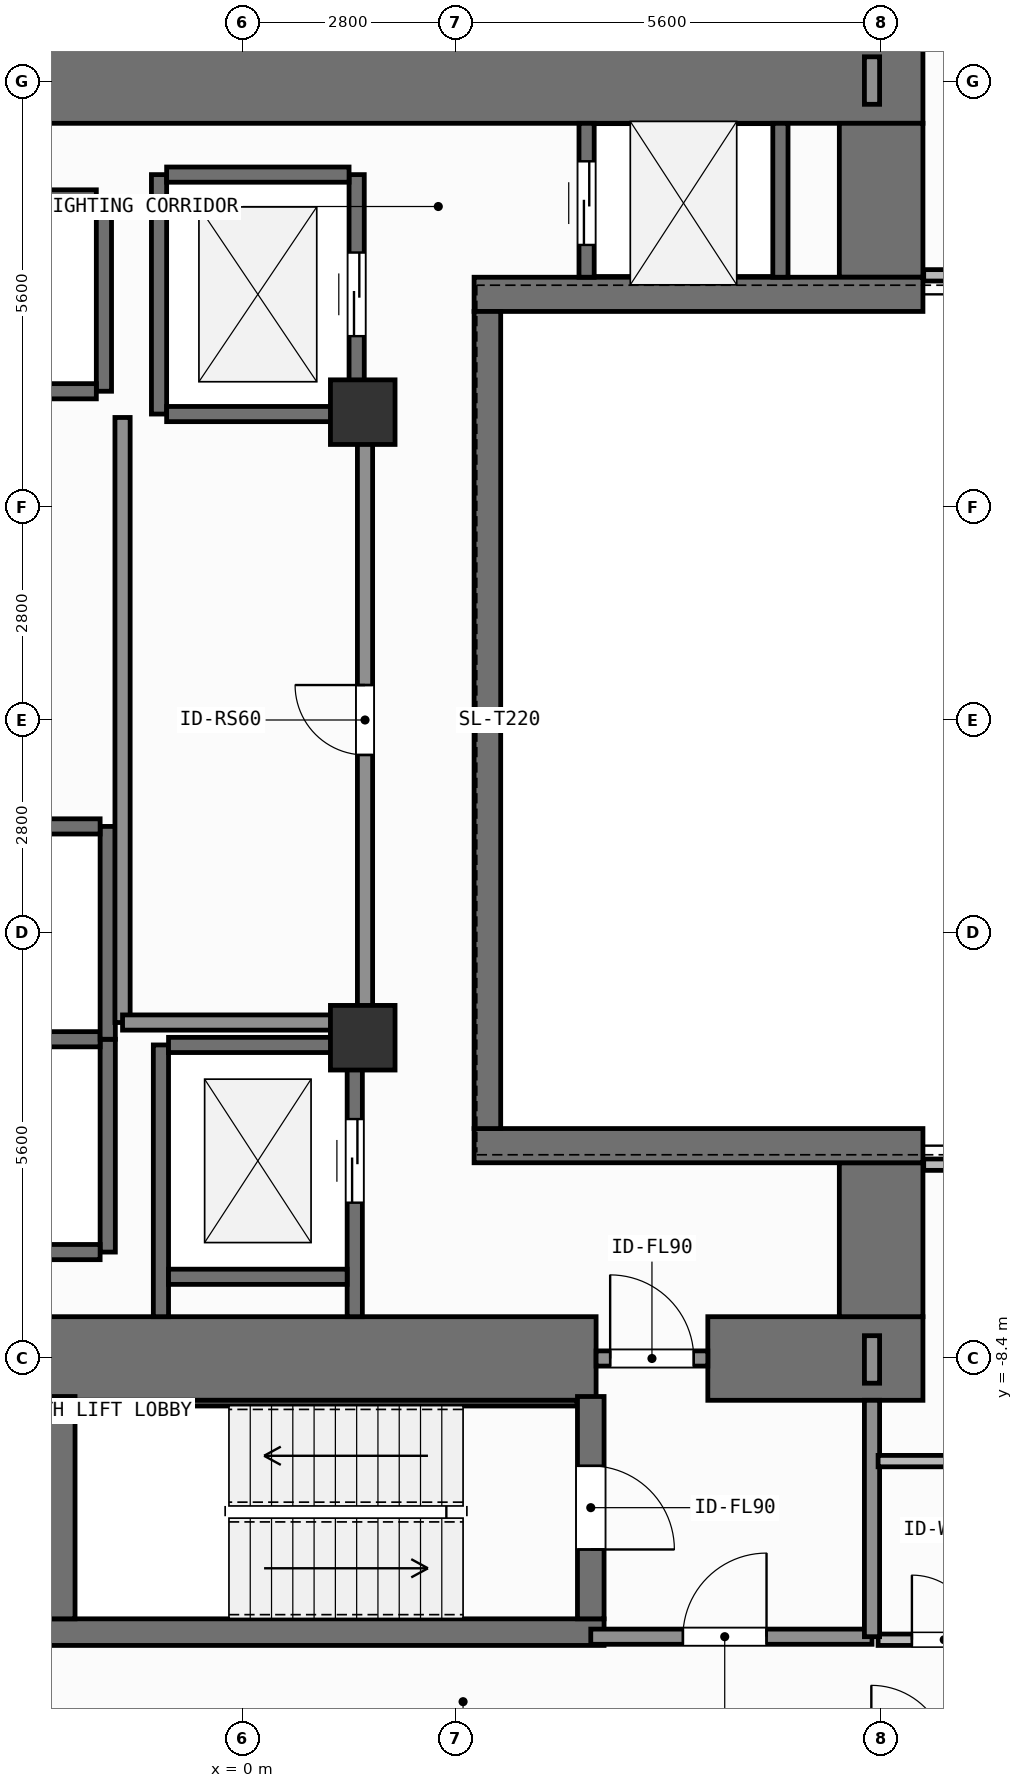
"""IFC4 building model, lengths in metres.
Left out: names, types, materials, properties, quantities, classifications, styles, units other than length and angle.
Written with IfcOpenShell. Run it as: python <this file> out.ifc"""

import sys

from ifc_helpers import new_model, si_unit, direction, frame, frame_2d, origin, origin_2d, place, context, subcontext, project, spatial, rectangle, extrude, element, fill, save


model = new_model("IFC4")
c1 = context("Model", 3, precision=1e-05, world=origin(), true_north=direction((0.0, 1.0)))
c2 = subcontext(c1, "Body", "Model", "MODEL_VIEW")
j1 = project(units=[si_unit("LENGTHUNIT", "METRE"), si_unit("PLANEANGLEUNIT", "RADIAN")], contexts=[c1])
p1 = place(None, origin())
s1 = spatial("IfcSite", under=j1, at=p1, CompositionType="ELEMENT")
p2 = place(p1, origin())
s2 = spatial("IfcBuilding", under=s1, at=p2, CompositionType="ELEMENT")
p3 = place(p2, frame((0.0, 0.0, 38.4)))
s3 = spatial("IfcBuildingStorey", under=s2, at=p3, CompositionType="ELEMENT", Elevation=38.4)
p4 = place(p3, frame((-2.62, -8.4, 0.0), z_axis=(0.0, 0.0, 1.0), x_axis=(1.0, 0.0, 0.0)))
e1 = element("IfcWall", 1, at=p4, inside=s3, PredefinedType="SHEAR", context=c2, shape_type="SweptSolid", body=[
    extrude(rectangle(XDim=7.27, YDim=1.1, at=frame_2d((3.635, 0.0))), origin(), (0.0, 0.0, 1.0), 3.9),
])
p5 = place(p3, frame((6.12, -8.4, 0.0), z_axis=(0.0, 0.0, 1.0), x_axis=(1.0, 0.0, 0.0)))
e2 = element("IfcWall", 2, at=p5, inside=s3, PredefinedType="SHEAR", context=c2, shape_type="SweptSolid", body=[
    extrude(rectangle(XDim=2.83, YDim=1.1, at=frame_2d((1.415, 0.0))), origin(), (0.0, 0.0, 1.0), 3.9),
])
p6 = place(p3, frame((-7.55, 8.4, 0.0), z_axis=(0.0, 0.0, 1.0), x_axis=(1.0, 0.0, 0.0)))
e3 = element("IfcWall", 3, at=p6, inside=s3, PredefinedType="SHEAR", context=c2, shape_type="SweptSolid", body=[
    extrude(rectangle(XDim=16.5, YDim=1.1, at=frame_2d((8.25, 0.0))), origin(), (0.0, 0.0, 1.0), 3.9),
])
for number, where, z_axis, x_axis in (
    (4, (8.4, -7.85, 0.0), (0.0, 0.0, 1.0), (0.0, 1.0, 0.0)),
    (5, (8.4, 5.825, 0.0), (0.0, 0.0, 1.0), (0.0, 1.0, 0.0)),
):
    element("IfcWall", number, at=place(p3, frame(where, z_axis=z_axis, x_axis=x_axis)), inside=s3, PredefinedType="SHEAR", context=c2, shape_type="SweptSolid", body=[
        extrude(rectangle(XDim=2.025, YDim=1.1, at=frame_2d((1.013, 0.0))), origin(), (0.0, 0.0, 1.0), 3.9),
    ])
for number, where, z_axis, x_axis in (
    (6, (3.045, -5.6, 0.0), (0.0, 0.0, 1.0), (1.0, 0.0, 0.0)),
    (7, (3.045, 5.6, 0.0), (0.0, 0.0, 1.0), (1.0, 0.0, 0.0)),
):
    element("IfcWall", number, at=place(p3, frame(where, z_axis=z_axis, x_axis=x_axis)), inside=s3, PredefinedType="SHEAR", context=c2, shape_type="SweptSolid", body=[
        extrude(rectangle(XDim=5.905, YDim=0.45, at=frame_2d((2.953, 0.0))), origin(), (0.0, 0.0, 1.0), 3.9),
    ])
p7 = place(p3, frame((3.22, -5.375, 0.0), z_axis=(0.0, 0.0, 1.0), x_axis=(0.0, 1.0, 0.0)))
e8 = element("IfcWall", 8, at=p7, inside=s3, PredefinedType="SHEAR", context=c2, shape_type="SweptSolid", body=[
    extrude(rectangle(XDim=10.75, YDim=0.35, at=frame_2d((5.375, 0.0))), origin(), (0.0, 0.0, 1.0), 3.9),
])
p8 = place(p3, frame((-2.555, -12.0, 0.0), z_axis=(0.0, 0.0, 1.0), x_axis=(1.0, 0.0, 0.0)))
e9 = element("IfcWall", 9, at=p8, inside=s3, PredefinedType="SHEAR", context=c2, shape_type="SweptSolid", body=[
    extrude(rectangle(XDim=7.31, YDim=0.35, at=frame_2d((3.655, 0.0))), origin(), (0.0, 0.0, 1.0), 3.9),
])
p9 = place(p3, frame((-2.2, -8.988, 0.0), z_axis=(0.0, 0.0, 1.0), x_axis=(1.0, 0.0, 0.0)))
e10 = element("IfcWall", 10, at=p9, inside=s3, PredefinedType="SHEAR", context=c2, shape_type="SweptSolid", body=[
    extrude(rectangle(XDim=6.6, YDim=0.075, at=frame_2d((3.3, 0.0))), origin(), (0.0, 0.0, 1.0), 3.9),
])
p10 = place(p3, frame((-2.38, -11.825, 0.0), z_axis=(0.0, 0.0, 1.0), x_axis=(0.0, 1.0, 0.0)))
e11 = element("IfcWall", 11, at=p10, inside=s3, PredefinedType="SHEAR", context=c2, shape_type="SweptSolid", body=[
    extrude(rectangle(XDim=2.925, YDim=0.35, at=frame_2d((1.462, 0.0))), origin(), (0.0, 0.0, 1.0), 3.9),
])
p11 = place(p3, frame((4.58, -8.9, 0.0), z_axis=(0.0, 0.0, 1.0), x_axis=(0.0, -1.0, 0.0)))
e12 = element("IfcWall", 12, at=p11, inside=s3, PredefinedType="SHEAR", context=c2, shape_type="SweptSolid", body=[
    extrude(rectangle(XDim=2.925, YDim=0.35, at=frame_2d((1.462, 0.0))), origin(), (0.0, 0.0, 1.0), 3.9),
])
p12 = place(p11, frame((0.913, 0.0, 0.0)))
e13 = element("IfcOpeningElement", 13, at=p12, cuts=e12, PredefinedType="OPENING", context=c2, shape_type="SweptSolid", body=[
    extrude(rectangle(XDim=1.1, YDim=2.15, at=frame_2d((0.55, 1.075))), frame((0.0, 0.185, 0.0), z_axis=(0.0, -1.0, 0.0), x_axis=(1.0, 0.0, 0.0)), (0.0, 0.0, 1.0), 0.37),
])
for number, where, z_axis, x_axis in (
    (14, (1.58, -4.18, 0.0), (0.0, 0.0, 1.0), (1.0, 0.0, 0.0)),
    (15, (1.58, 4.05, 0.0), (0.0, 0.0, 1.0), (1.0, 0.0, 0.0)),
):
    element("IfcColumn", number, at=place(p3, frame(where, z_axis=z_axis, x_axis=x_axis)), inside=s3, PredefinedType="COLUMN", context=c2, shape_type="SweptSolid", body=[
        extrude(rectangle(XDim=0.85, YDim=0.85, at=origin_2d()), origin(), (0.0, 0.0, 1.0), 3.9),
    ])
p13 = place(p3, frame((-1.825, 4.325, 0.0), z_axis=(0.0, 0.0, 1.0), x_axis=(0.0, 1.0, 0.0)))
e16 = element("IfcWall", 16, at=p13, inside=s3, PredefinedType="SHEAR", context=c2, shape_type="SweptSolid", body=[
    extrude(rectangle(XDim=2.55, YDim=0.2, at=frame_2d((1.275, 0.0))), origin(), (0.0, 0.0, 1.0), 3.68),
])
for number, where, z_axis, x_axis in (
    (17, (-4.275, 4.325, 0.0), (0.0, 0.0, 1.0), (1.0, 0.0, 0.0)),
    (18, (-4.275, 6.875, 0.0), (0.0, 0.0, 1.0), (1.0, 0.0, 0.0)),
):
    element("IfcWall", number, at=place(p3, frame(where, z_axis=z_axis, x_axis=x_axis)), inside=s3, PredefinedType="SHEAR", context=c2, shape_type="SweptSolid", body=[
        extrude(rectangle(XDim=2.35, YDim=0.2, at=frame_2d((1.175, 0.0))), origin(), (0.0, 0.0, 1.0), 3.68),
    ])
p14 = place(p3, frame((-1.775, -7.0, 0.0), z_axis=(0.0, 0.0, 1.0), x_axis=(0.0, 1.0, 0.0)))
e19 = element("IfcWall", 19, at=p14, inside=s3, PredefinedType="SHEAR", context=c2, shape_type="SweptSolid", body=[
    extrude(rectangle(XDim=2.8, YDim=0.2, at=frame_2d((1.4, 0.0))), origin(), (0.0, 0.0, 1.0), 3.68),
])
for number, where, z_axis, x_axis in (
    (20, (-4.325, -7.0, 0.0), (0.0, 0.0, 1.0), (1.0, 0.0, 0.0)),
    (21, (-4.325, -4.2, 0.0), (0.0, 0.0, 1.0), (1.0, 0.0, 0.0)),
):
    element("IfcWall", number, at=place(p3, frame(where, z_axis=z_axis, x_axis=x_axis)), inside=s3, PredefinedType="SHEAR", context=c2, shape_type="SweptSolid", body=[
        extrude(rectangle(XDim=2.45, YDim=0.2, at=frame_2d((1.225, 0.0))), origin(), (0.0, 0.0, 1.0), 3.68),
    ])
p15 = place(p3, frame((-1.775, -4.2, 0.0), z_axis=(0.0, 0.0, 1.0), x_axis=(0.0, 1.0, 0.0)))
e22 = element("IfcWall", 22, at=p15, inside=s3, PredefinedType="SHEAR", context=c2, shape_type="SweptSolid", body=[
    extrude(rectangle(XDim=2.8, YDim=0.2, at=frame_2d((1.4, 0.0))), origin(), (0.0, 0.0, 1.0), 3.68),
])
p16 = place(p3, frame((-4.325, -1.4, 0.0), z_axis=(0.0, 0.0, 1.0), x_axis=(1.0, 0.0, 0.0)))
e23 = element("IfcWall", 23, at=p16, inside=s3, PredefinedType="SHEAR", context=c2, shape_type="SweptSolid", body=[
    extrude(rectangle(XDim=2.45, YDim=0.2, at=frame_2d((1.225, 0.0))), origin(), (0.0, 0.0, 1.0), 3.68),
])
p17 = place(p3, frame((-1.1, 4.025, 0.0), z_axis=(0.0, 0.0, 1.0), x_axis=(0.0, 1.0, 0.0)))
e24 = element("IfcWall", 24, at=p17, inside=s3, PredefinedType="SHEAR", context=c2, shape_type="SweptSolid", body=[
    extrude(rectangle(XDim=3.15, YDim=0.2, at=frame_2d((1.575, 0.0))), origin(), (0.0, 0.0, 1.0), 3.68),
])
p18 = place(p3, frame((1.5, 4.025, 0.0), z_axis=(0.0, 0.0, 1.0), x_axis=(0.0, 1.0, 0.0)))
e25 = element("IfcWall", 25, at=p18, inside=s3, PredefinedType="SHEAR", context=c2, shape_type="SweptSolid", body=[
    extrude(rectangle(XDim=3.15, YDim=0.2, at=frame_2d((1.575, 0.0))), origin(), (0.0, 0.0, 1.0), 3.68),
])
p19 = place(p18, frame((1.025, 0.0, 0.0)))
e26 = element("IfcOpeningElement", 26, at=p19, cuts=e25, PredefinedType="OPENING", context=c2, shape_type="SweptSolid", body=[
    extrude(rectangle(XDim=1.1, YDim=2.2, at=frame_2d((0.55, 1.1))), frame((0.0, 0.11, 0.0), z_axis=(0.0, -1.0, 0.0), x_axis=(1.0, 0.0, 0.0)), (0.0, 0.0, 1.0), 0.22),
])
for number, where, z_axis, x_axis in (
    (27, (-1.0, 4.025, 0.0), (0.0, 0.0, 1.0), (1.0, 0.0, 0.0)),
    (28, (-1.0, 7.175, 0.0), (0.0, 0.0, 1.0), (1.0, 0.0, 0.0)),
):
    element("IfcWall", number, at=place(p3, frame(where, z_axis=z_axis, x_axis=x_axis)), inside=s3, PredefinedType="SHEAR", context=c2, shape_type="SweptSolid", body=[
        extrude(rectangle(XDim=2.4, YDim=0.2, at=frame_2d((1.2, 0.0))), origin(), (0.0, 0.0, 1.0), 3.68),
    ])
p20 = place(p3, frame((-1.075, -7.85, 0.0), z_axis=(0.0, 0.0, 1.0), x_axis=(0.0, 1.0, 0.0)))
e29 = element("IfcWall", 29, at=p20, inside=s3, PredefinedType="SHEAR", context=c2, shape_type="SweptSolid", body=[
    extrude(rectangle(XDim=3.575, YDim=0.2, at=frame_2d((1.788, 0.0))), origin(), (0.0, 0.0, 1.0), 3.68),
])
p21 = place(p3, frame((1.475, -7.85, 0.0), z_axis=(0.0, 0.0, 1.0), x_axis=(0.0, 1.0, 0.0)))
e30 = element("IfcWall", 30, at=p21, inside=s3, PredefinedType="SHEAR", context=c2, shape_type="SweptSolid", body=[
    extrude(rectangle(XDim=3.575, YDim=0.2, at=frame_2d((1.788, 0.0))), origin(), (0.0, 0.0, 1.0), 3.68),
])
p22 = place(p21, frame((1.5, 0.0, 0.0)))
e31 = element("IfcOpeningElement", 31, at=p22, cuts=e30, PredefinedType="OPENING", context=c2, shape_type="SweptSolid", body=[
    extrude(rectangle(XDim=1.1, YDim=2.2, at=frame_2d((0.55, 1.1))), frame((0.0, 0.11, 0.0), z_axis=(0.0, -1.0, 0.0), x_axis=(1.0, 0.0, 0.0)), (0.0, 0.0, 1.0), 0.22),
])
for number, where, z_axis, x_axis in (
    (32, (-0.975, -7.325, 0.0), (0.0, 0.0, 1.0), (1.0, 0.0, 0.0)),
    (33, (-0.975, -4.275, 0.0), (0.0, 0.0, 1.0), (1.0, 0.0, 0.0)),
):
    element("IfcWall", number, at=place(p3, frame(where, z_axis=z_axis, x_axis=x_axis)), inside=s3, PredefinedType="SHEAR", context=c2, shape_type="SweptSolid", body=[
        extrude(rectangle(XDim=2.35, YDim=0.2, at=frame_2d((1.175, 0.0))), origin(), (0.0, 0.0, 1.0), 3.68),
    ])
p23 = place(p3, frame((4.525, 5.825, 0.0), z_axis=(0.0, 0.0, 1.0), x_axis=(0.0, 1.0, 0.0)))
e34 = element("IfcWall", 34, at=p23, inside=s3, PredefinedType="SHEAR", context=c2, shape_type="SweptSolid", body=[
    extrude(rectangle(XDim=2.025, YDim=0.2, at=frame_2d((1.013, 0.0))), origin(), (0.0, 0.0, 1.0), 3.68),
])
p24 = place(p23, frame((0.425, 0.0, 0.0)))
e35 = element("IfcOpeningElement", 35, at=p24, cuts=e34, PredefinedType="OPENING", context=c2, shape_type="SweptSolid", body=[
    extrude(rectangle(XDim=1.1, YDim=2.2, at=frame_2d((0.55, 1.1))), frame((0.0, 0.11, 0.0), z_axis=(0.0, -1.0, 0.0), x_axis=(1.0, 0.0, 0.0)), (0.0, 0.0, 1.0), 0.22),
])
p25 = place(p3, frame((7.075, 5.825, 0.0), z_axis=(0.0, 0.0, 1.0), x_axis=(0.0, 1.0, 0.0)))
e36 = element("IfcWall", 36, at=p25, inside=s3, PredefinedType="SHEAR", context=c2, shape_type="SweptSolid", body=[
    extrude(rectangle(XDim=2.025, YDim=0.2, at=frame_2d((1.013, 0.0))), origin(), (0.0, 0.0, 1.0), 3.68),
])
p26 = place(p3, frame((4.58, -12.06, 0.0), z_axis=(0.0, 0.0, 1.0), x_axis=(1.0, 0.0, 0.0)))
e37 = element("IfcWall", 37, at=p26, inside=s3, PredefinedType="SOLIDWALL", context=c2, shape_type="SweptSolid", body=[
    extrude(rectangle(XDim=3.7, YDim=0.2, at=frame_2d((1.85, 0.0))), origin(), (0.0, 0.0, 1.0), 3.68),
])
p27 = place(p26, frame((1.212, 0.0, 0.0)))
e38 = element("IfcOpeningElement", 38, at=p27, cuts=e37, PredefinedType="OPENING", context=c2, shape_type="SweptSolid", body=[
    extrude(rectangle(XDim=1.1, YDim=2.15, at=frame_2d((0.55, 1.075))), frame((0.0, 0.11, 0.0), z_axis=(0.0, -1.0, 0.0), x_axis=(1.0, 0.0, 0.0)), (0.0, 0.0, 1.0), 0.22),
])
p28 = place(p3, frame((4.65, -8.4, 0.0), z_axis=(0.0, 0.0, 1.0), x_axis=(1.0, 0.0, 0.0)))
e39 = element("IfcWall", 39, at=p28, inside=s3, PredefinedType="SOLIDWALL", context=c2, shape_type="SweptSolid", body=[
    extrude(rectangle(XDim=1.47, YDim=0.2, at=frame_2d((0.735, 0.0))), origin(), (0.0, 0.0, 1.0), 2.72),
])
p29 = place(p28, frame((0.185, 0.0, 0.0)))
e40 = element("IfcOpeningElement", 40, at=p29, cuts=e39, PredefinedType="OPENING", context=c2, shape_type="SweptSolid", body=[
    extrude(rectangle(XDim=1.1, YDim=2.15, at=frame_2d((0.55, 1.075))), frame((0.0, 0.11, 0.0), z_axis=(0.0, -1.0, 0.0), x_axis=(1.0, 0.0, 0.0)), (0.0, 0.0, 1.0), 0.22),
])
p30 = place(p3, frame((1.61, -3.98, 0.0), z_axis=(0.0, 0.0, 1.0), x_axis=(0.0, 1.0, 0.0)))
e41 = element("IfcWall", 41, at=p30, inside=s3, PredefinedType="SOLIDWALL", context=c2, shape_type="SweptSolid", body=[
    extrude(rectangle(XDim=7.96, YDim=0.2, at=frame_2d((3.98, 0.0))), origin(), (0.0, 0.0, 1.0), 3.68),
])
p31 = place(p30, frame((3.52, 0.0, 0.0)))
e42 = element("IfcOpeningElement", 42, at=p31, cuts=e41, PredefinedType="OPENING", context=c2, shape_type="SweptSolid", body=[
    extrude(rectangle(XDim=0.92, YDim=2.1, at=frame_2d((0.46, 1.05))), frame((0.0, 0.11, 0.0), z_axis=(0.0, -1.0, 0.0), x_axis=(1.0, 0.0, 0.0)), (0.0, 0.0, 1.0), 0.22),
])
p32 = place(p3, frame((8.36, -12.1, 0.0), z_axis=(0.0, 0.0, 1.0), x_axis=(1.0, 0.0, 0.0)))
e43 = element("IfcWall", 43, at=p32, inside=s3, PredefinedType="PARTITIONING", context=c2, shape_type="SweptSolid", body=[
    extrude(rectangle(XDim=1.74, YDim=0.15, at=frame_2d((0.87, 0.0))), origin(), (0.0, 0.0, 1.0), 3.68),
])
p33 = place(p32, frame((0.445, 0.0, 0.0)))
e44 = element("IfcOpeningElement", 44, at=p33, cuts=e43, PredefinedType="OPENING", context=c2, shape_type="SweptSolid", body=[
    extrude(rectangle(XDim=0.85, YDim=2.1, at=frame_2d((0.425, 1.05))), frame((0.0, 0.085, 0.0), z_axis=(0.0, -1.0, 0.0), x_axis=(1.0, 0.0, 0.0)), (0.0, 0.0, 1.0), 0.17),
])
p34 = place(p3, frame((8.28, -12.06, 0.0), z_axis=(0.0, 0.0, 1.0), x_axis=(0.0, 1.0, 0.0)))
e45 = element("IfcWall", 45, at=p34, inside=s3, PredefinedType="SOLIDWALL", context=c2, shape_type="SweptSolid", body=[
    extrude(rectangle(XDim=3.11, YDim=0.2, at=frame_2d((1.555, 0.0))), origin(), (0.0, 0.0, 1.0), 3.68),
])
p35 = place(p3, frame((-1.58, -3.98, 0.0), z_axis=(0.0, 0.0, 1.0), x_axis=(0.0, 1.0, 0.0)))
e46 = element("IfcWall", 46, at=p35, inside=s3, PredefinedType="SOLIDWALL", context=c2, shape_type="SweptSolid", body=[
    extrude(rectangle(XDim=7.96, YDim=0.2, at=frame_2d((3.98, 0.0))), origin(), (0.0, 0.0, 1.0), 3.68),
])
p36 = place(p3, frame((-1.58, -3.98, 0.0), z_axis=(0.0, 0.0, 1.0), x_axis=(1.0, 0.0, 0.0)))
e47 = element("IfcWall", 47, at=p36, inside=s3, PredefinedType="SOLIDWALL", context=c2, shape_type="SweptSolid", body=[
    extrude(rectangle(XDim=3.19, YDim=0.2, at=frame_2d((1.595, 0.0))), origin(), (0.0, 0.0, 1.0), 3.68),
])
p37 = place(p3, frame((8.28, -8.725, 0.0), z_axis=(0.0, 0.0, 1.0), x_axis=(0.0, 1.0, 0.0)))
e48 = element("IfcWall", 48, at=p37, inside=s3, PredefinedType="SOLIDWALL", context=c2, shape_type="SweptSolid", body=[
    extrude(rectangle(XDim=0.625, YDim=0.2, at=frame_2d((0.312, 0.0))), origin(), (0.0, 0.0, 1.0), 3.68),
])
p38 = place(p3, frame((8.36, -9.75, 0.0), z_axis=(0.0, 0.0, 1.0), x_axis=(1.0, 0.0, 0.0)))
e49 = element("IfcWall", 49, at=p38, inside=s3, PredefinedType="PARTITIONING", context=c2, shape_type="SweptSolid", body=[
    extrude(rectangle(XDim=1.74, YDim=0.15, at=frame_2d((0.87, 0.0))), origin(), (0.0, 0.0, 1.0), 3.68),
])
p39 = place(p3, frame((8.96, -5.85, 0.0), z_axis=(0.0, 0.0, 1.0), x_axis=(1.0, 0.0, 0.0)))
e50 = element("IfcWall", 50, at=p39, inside=s3, PredefinedType="PARTITIONING", context=c2, shape_type="SweptSolid", body=[
    extrude(rectangle(XDim=6.62, YDim=0.15, at=frame_2d((3.31, 0.0))), origin(), (0.0, 0.0, 1.0), 3.68),
])
p40 = place(p3, frame((8.28, 8.1, 0.0), z_axis=(0.0, 0.0, 1.0), x_axis=(0.0, 1.0, 0.0)))
e51 = element("IfcWall", 51, at=p40, inside=s3, PredefinedType="SOLIDWALL", context=c2, shape_type="SweptSolid", body=[
    extrude(rectangle(XDim=0.625, YDim=0.2, at=frame_2d((0.312, 0.0))), origin(), (0.0, 0.0, 1.0), 3.68),
])
p41 = place(p3, frame((8.96, 5.85, 0.0), z_axis=(0.0, 0.0, 1.0), x_axis=(1.0, 0.0, 0.0)))
e52 = element("IfcWall", 52, at=p41, inside=s3, PredefinedType="PARTITIONING", context=c2, shape_type="SweptSolid", body=[
    extrude(rectangle(XDim=6.62, YDim=0.15, at=frame_2d((3.31, 0.0))), origin(), (0.0, 0.0, 1.0), 3.68),
])
p42 = place(p19, origin())
e53 = element("IfcDoor", 53, at=p42, inside=s3, OperationType="SLIDING_TO_LEFT", PredefinedType="DOOR", context=c2, shape_type="SweptSolid", body=[
    extrude(rectangle(XDim=1.1, YDim=2.2, at=frame_2d((0.55, 1.1))), frame((0.0, 0.025, 0.0), z_axis=(0.0, -1.0, 0.0), x_axis=(1.0, 0.0, 0.0)), (0.0, 0.0, 1.0), 0.05),
])
fill(e26, e53)
p43 = place(p22, origin())
e54 = element("IfcDoor", 54, at=p43, inside=s3, OperationType="SLIDING_TO_LEFT", PredefinedType="DOOR", context=c2, shape_type="SweptSolid", body=[
    extrude(rectangle(XDim=1.1, YDim=2.2, at=frame_2d((0.55, 1.1))), frame((0.0, 0.025, 0.0), z_axis=(0.0, -1.0, 0.0), x_axis=(1.0, 0.0, 0.0)), (0.0, 0.0, 1.0), 0.05),
])
fill(e31, e54)
p44 = place(p24, origin())
e55 = element("IfcDoor", 55, at=p44, inside=s3, OperationType="SLIDING_TO_LEFT", PredefinedType="DOOR", context=c2, shape_type="SweptSolid", body=[
    extrude(rectangle(XDim=1.1, YDim=2.2, at=frame_2d((0.55, 1.1))), frame((0.0, 0.025, 0.0), z_axis=(0.0, -1.0, 0.0), x_axis=(1.0, 0.0, 0.0)), (0.0, 0.0, 1.0), 0.05),
])
fill(e35, e55)
p45 = place(p12, origin())
e56 = element("IfcDoor", 56, at=p45, inside=s3, OperationType="SINGLE_SWING_RIGHT", PredefinedType="DOOR", context=c2, shape_type="SweptSolid", body=[
    extrude(rectangle(XDim=1.1, YDim=2.15, at=frame_2d((0.55, 1.075))), frame((0.0, 0.025, 0.0), z_axis=(0.0, -1.0, 0.0), x_axis=(1.0, 0.0, 0.0)), (0.0, 0.0, 1.0), 0.05),
])
fill(e13, e56)
p46 = place(p27, origin())
e57 = element("IfcDoor", 57, at=p46, inside=s3, OperationType="SINGLE_SWING_RIGHT", PredefinedType="DOOR", context=c2, shape_type="SweptSolid", body=[
    extrude(rectangle(XDim=1.1, YDim=2.15, at=frame_2d((0.55, 1.075))), frame((0.0, 0.025, 0.0), z_axis=(0.0, -1.0, 0.0), x_axis=(1.0, 0.0, 0.0)), (0.0, 0.0, 1.0), 0.05),
])
fill(e38, e57)
p47 = place(p29, origin())
e58 = element("IfcDoor", 58, at=p47, inside=s3, OperationType="SINGLE_SWING_LEFT", PredefinedType="DOOR", context=c2, shape_type="SweptSolid", body=[
    extrude(rectangle(XDim=1.1, YDim=2.15, at=frame_2d((0.55, 1.075))), frame((0.0, 0.025, 0.0), z_axis=(0.0, -1.0, 0.0), x_axis=(1.0, 0.0, 0.0)), (0.0, 0.0, 1.0), 0.05),
])
fill(e40, e58)
p48 = place(p31, origin())
e59 = element("IfcDoor", 59, at=p48, inside=s3, OperationType="SINGLE_SWING_RIGHT", PredefinedType="DOOR", context=c2, shape_type="SweptSolid", body=[
    extrude(rectangle(XDim=0.92, YDim=2.1, at=frame_2d((0.46, 1.05))), frame((0.0, 0.025, 0.0), z_axis=(0.0, -1.0, 0.0), x_axis=(1.0, 0.0, 0.0)), (0.0, 0.0, 1.0), 0.05),
])
fill(e42, e59)
p49 = place(p33, origin())
e60 = element("IfcDoor", 60, at=p49, inside=s3, OperationType="SINGLE_SWING_LEFT", PredefinedType="DOOR", context=c2, shape_type="SweptSolid", body=[
    extrude(rectangle(XDim=0.85, YDim=2.1, at=frame_2d((0.425, 1.05))), frame((0.0, 0.025, 0.0), z_axis=(0.0, -1.0, 0.0), x_axis=(1.0, 0.0, 0.0)), (0.0, 0.0, 1.0), 0.05),
])
fill(e44, e60)
save(model, sys.argv[1])
